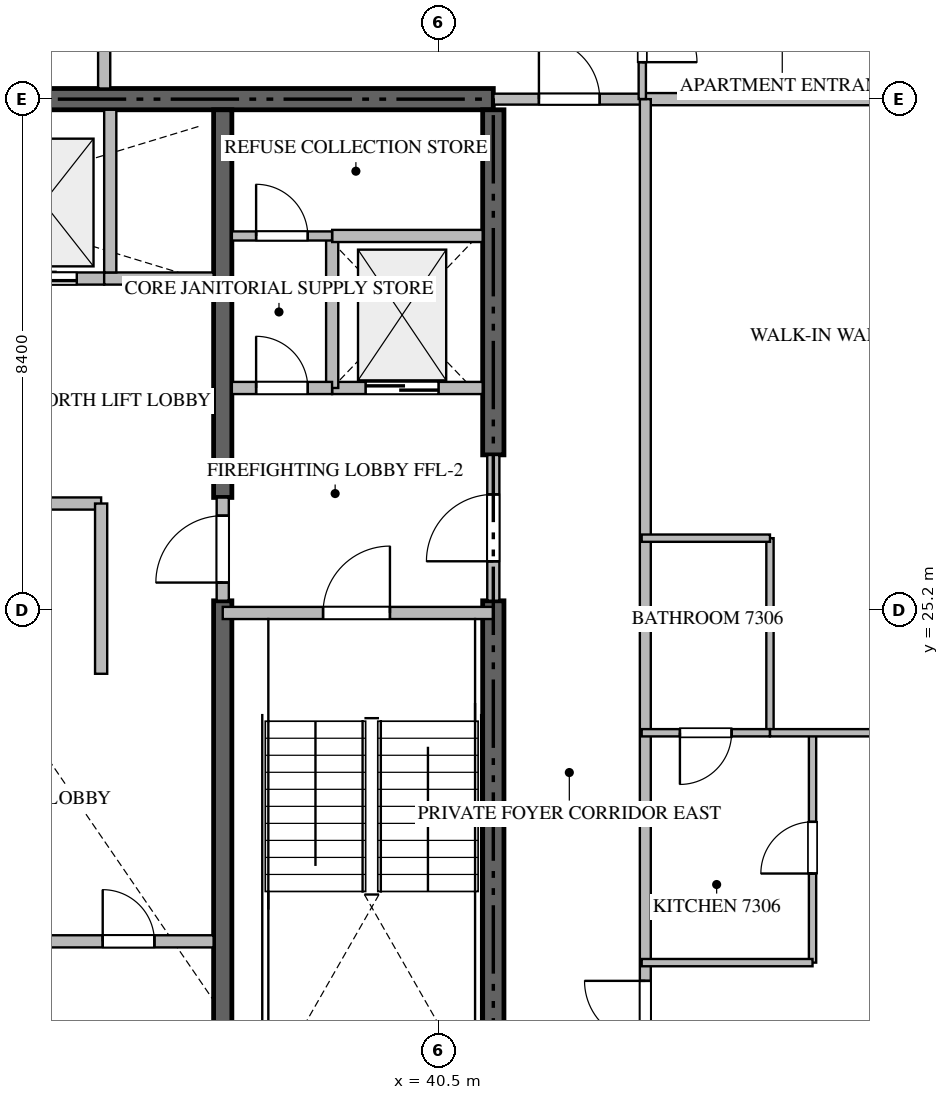
"""IFC4 building model, lengths in metres.
Left out: names, types, materials, properties, quantities, classifications, styles, units other than length and angle.
Written with IfcOpenShell. Run it as: python <this file> out.ifc"""

import sys

from ifc_helpers import new_model, si_unit, direction, frame, frame_2d, origin, place, context, subcontext, project, spatial, rectangle, extrude, source, transform, mapped, element, fill, save


model = new_model("IFC4")
c1 = context("Model", 3, precision=1e-05, world=origin(), true_north=direction((0.0, 1.0)))
c2 = subcontext(c1, "Body", "Model", "MODEL_VIEW")
j1 = project(units=[si_unit("LENGTHUNIT", "METRE"), si_unit("PLANEANGLEUNIT", "RADIAN")], contexts=[c1])
p1 = place(None, origin())
s1 = spatial("IfcSite", under=j1, at=p1, CompositionType="ELEMENT")
p2 = place(p1, origin())
s2 = spatial("IfcBuilding", under=s1, at=p2, CompositionType="ELEMENT")
p3 = place(p2, frame((0.0, 0.0, 293.45)))
s3 = spatial("IfcBuildingStorey", under=s2, at=p3, CompositionType="ELEMENT", Elevation=293.45)
p4 = place(p3, frame((41.4, 33.6, -0.26), z_axis=(0.0, 0.0, 1.0), x_axis=(-1.0, 0.0, 0.0)))
e1 = element("IfcWall", 1, at=p4, inside=s3, PredefinedType="SHEAR", context=c2, shape_type="SweptSolid", body=[
    extrude(rectangle(XDim=18.0, YDim=0.35, at=frame_2d((9.0, 0.0))), origin(), (0.0, 0.0, 1.0), 4.048),
])
p5 = place(p3, frame((41.4, 16.975, -0.26), z_axis=(0.0, 0.0, 1.0), x_axis=(0.0, 1.0, 0.0)))
e2 = element("IfcWall", 2, at=p5, inside=s3, PredefinedType="SHEAR", context=c2, shape_type="SweptSolid", body=[
    extrude(rectangle(XDim=8.375, YDim=0.35, at=frame_2d((4.188, 0.0))), origin(), (0.0, 0.0, 1.0), 4.048),
])
p6 = place(p3, frame((41.4, 27.75, -0.26), z_axis=(0.0, 0.0, 1.0), x_axis=(0.0, 1.0, 0.0)))
e3 = element("IfcWall", 3, at=p6, inside=s3, PredefinedType="SHEAR", context=c2, shape_type="SweptSolid", body=[
    extrude(rectangle(XDim=5.675, YDim=0.35, at=frame_2d((2.837, 0.0))), origin(), (0.0, 0.0, 1.0), 4.048),
])
p7 = place(p3, frame((36.95, 16.975, -0.26), z_axis=(0.0, 0.0, 1.0), x_axis=(0.0, 1.0, 0.0)))
e4 = element("IfcWall", 4, at=p7, inside=s3, PredefinedType="SHEAR", context=c2, shape_type="SweptSolid", body=[
    extrude(rectangle(XDim=8.375, YDim=0.3, at=frame_2d((4.188, 0.0))), origin(), (0.0, 0.0, 1.0), 4.048),
])
p8 = place(p3, frame((36.95, 27.05, -0.26), z_axis=(0.0, 0.0, 1.0), x_axis=(0.0, 1.0, 0.0)))
e5 = element("IfcWall", 5, at=p8, inside=s3, PredefinedType="SHEAR", context=c2, shape_type="SweptSolid", body=[
    extrude(rectangle(XDim=6.375, YDim=0.3, at=frame_2d((3.188, 0.0))), origin(), (0.0, 0.0, 1.0), 4.048),
])
p9 = place(p3, frame((36.95, 25.15, 0.0), z_axis=(0.0, 0.0, 1.0), x_axis=(1.0, 0.0, 0.0)))
e6 = element("IfcWall", 6, at=p9, inside=s3, PredefinedType="STANDARD", context=c2, shape_type="SweptSolid", body=[
    extrude(rectangle(XDim=4.45, YDim=0.2, at=frame_2d((2.225, 0.0))), origin(), (0.0, 0.0, 1.0), 3.79),
])
p10 = place(p9, frame((1.65, 0.0, 0.0)))
e7 = element("IfcOpeningElement", 7, at=p10, cuts=e6, PredefinedType="OPENING", context=c2, shape_type="SweptSolid", body=[
    extrude(rectangle(XDim=1.1, YDim=2.15, at=frame_2d((0.55, 1.075))), frame((0.0, 0.11, 0.0), z_axis=(0.0, -1.0, 0.0), x_axis=(1.0, 0.0, 0.0)), (0.0, 0.0, 1.0), 0.22),
])
p11 = place(p3, frame((38.75, 28.85, 0.0), z_axis=(0.0, 0.0, 1.0), x_axis=(1.0, 0.0, 0.0)))
e8 = element("IfcWall", 8, at=p11, inside=s3, PredefinedType="STANDARD", context=c2, shape_type="SweptSolid", body=[
    extrude(rectangle(XDim=2.475, YDim=0.2, at=frame_2d((1.238, 0.0))), origin(), (0.0, 0.0, 1.0), 3.79),
])
p12 = place(p11, frame((0.55, 0.0, 0.0)))
e9 = element("IfcOpeningElement", 9, at=p12, cuts=e8, PredefinedType="OPENING", context=c2, shape_type="SweptSolid", body=[
    extrude(rectangle(XDim=1.2, YDim=2.2, at=frame_2d((0.6, 1.1))), frame((0.0, 0.11, 0.0), z_axis=(0.0, -1.0, 0.0), x_axis=(1.0, 0.0, 0.0)), (0.0, 0.0, 1.0), 0.22),
])
p13 = place(p3, frame((32.85, 30.65, 0.0), z_axis=(0.0, 0.0, 1.0), x_axis=(1.0, 0.0, 0.0)))
e10 = element("IfcWall", 10, at=p13, inside=s3, PredefinedType="STANDARD", context=c2, shape_type="SweptSolid", body=[
    extrude(rectangle(XDim=2.15, YDim=0.2, at=frame_2d((1.075, 0.0))), origin(), (0.0, 0.0, 1.0), 3.79),
])
p14 = place(p13, frame((0.6, 0.0, 0.0)))
e11 = element("IfcOpeningElement", 11, at=p14, cuts=e10, PredefinedType="OPENING", context=c2, shape_type="SweptSolid", body=[
    extrude(rectangle(XDim=1.1, YDim=2.2, at=frame_2d((0.55, 1.1))), frame((0.0, 0.11, 0.0), z_axis=(0.0, -1.0, 0.0), x_axis=(1.0, 0.0, 0.0)), (0.0, 0.0, 1.0), 0.22),
])
p15 = place(p3, frame((35.0, 30.65, 0.0), z_axis=(0.0, 0.0, 1.0), x_axis=(1.0, 0.0, 0.0)))
e12 = element("IfcWall", 12, at=p15, inside=s3, PredefinedType="STANDARD", context=c2, shape_type="SweptSolid", body=[
    extrude(rectangle(XDim=1.8, YDim=0.2, at=frame_2d((0.9, 0.0))), origin(), (0.0, 0.0, 1.0), 3.79),
])
p16 = place(p3, frame((35.1, 30.75, 0.0), z_axis=(0.0, 0.0, 1.0), x_axis=(0.0, 1.0, 0.0)))
e13 = element("IfcWall", 13, at=p16, inside=s3, PredefinedType="STANDARD", context=c2, shape_type="SweptSolid", body=[
    extrude(rectangle(XDim=2.675, YDim=0.2, at=frame_2d((1.337, 0.0))), origin(), (0.0, 0.0, 1.0), 3.79),
])
p17 = place(p3, frame((38.75, 28.85, 0.0), z_axis=(0.0, 0.0, 1.0), x_axis=(0.0, 1.0, 0.0)))
e14 = element("IfcWall", 14, at=p17, inside=s3, PredefinedType="STANDARD", context=c2, shape_type="SweptSolid", body=[
    extrude(rectangle(XDim=2.5, YDim=0.2, at=frame_2d((1.25, 0.0))), origin(), (0.0, 0.0, 1.0), 3.79),
])
p18 = place(p3, frame((38.75, 31.35, 0.0), z_axis=(0.0, 0.0, 1.0), x_axis=(1.0, 0.0, 0.0)))
e15 = element("IfcWall", 15, at=p18, inside=s3, PredefinedType="STANDARD", context=c2, shape_type="SweptSolid", body=[
    extrude(rectangle(XDim=2.475, YDim=0.2, at=frame_2d((1.238, 0.0))), origin(), (0.0, 0.0, 1.0), 3.79),
])
p19 = place(p3, frame((37.1, 28.85, 0.0), z_axis=(0.0, 0.0, 1.0), x_axis=(1.0, 0.0, 0.0)))
e16 = element("IfcWall", 16, at=p19, inside=s3, PredefinedType="STANDARD", context=c2, shape_type="SweptSolid", body=[
    extrude(rectangle(XDim=1.648, YDim=0.2, at=frame_2d((0.824, 0.0))), origin(), (0.0, 0.0, 1.0), 3.79),
])
p20 = place(p19, frame((0.399, 0.0, 0.0)))
e17 = element("IfcOpeningElement", 17, at=p20, cuts=e16, PredefinedType="OPENING", context=c2, shape_type="SweptSolid", body=[
    extrude(rectangle(XDim=0.85, YDim=2.1, at=frame_2d((0.425, 1.05))), frame((0.0, 0.11, 0.0), z_axis=(0.0, -1.0, 0.0), x_axis=(1.0, 0.0, 0.0)), (0.0, 0.0, 1.0), 0.22),
])
p21 = place(p3, frame((41.4, 25.352, 0.0), z_axis=(0.0, 0.0, 1.0), x_axis=(0.0, 1.0, 0.0)))
e18 = element("IfcWall", 18, at=p21, inside=s3, PredefinedType="STANDARD", context=c2, shape_type="SweptSolid", body=[
    extrude(rectangle(XDim=2.396, YDim=0.2, at=frame_2d((1.198, 0.0))), origin(), (0.0, 0.0, 1.0), 3.79),
])
p22 = place(p21, frame((0.648, 0.0, 0.0)))
e19 = element("IfcOpeningElement", 19, at=p22, cuts=e18, PredefinedType="OPENING", context=c2, shape_type="SweptSolid", body=[
    extrude(rectangle(XDim=1.1, YDim=2.15, at=frame_2d((0.55, 1.075))), frame((0.0, 0.11, 0.0), z_axis=(0.0, -1.0, 0.0), x_axis=(1.0, 0.0, 0.0)), (0.0, 0.0, 1.0), 0.22),
])
p23 = place(p3, frame((36.95, 25.352, 0.0), z_axis=(0.0, 0.0, 1.0), x_axis=(0.0, 1.0, 0.0)))
e20 = element("IfcWall", 20, at=p23, inside=s3, PredefinedType="STANDARD", context=c2, shape_type="SweptSolid", body=[
    extrude(rectangle(XDim=1.696, YDim=0.2, at=frame_2d((0.848, 0.0))), origin(), (0.0, 0.0, 1.0), 3.79),
])
p24 = place(p23, frame((0.298, 0.0, 0.0)))
e21 = element("IfcOpeningElement", 21, at=p24, cuts=e20, PredefinedType="OPENING", context=c2, shape_type="SweptSolid", body=[
    extrude(rectangle(XDim=1.1, YDim=2.15, at=frame_2d((0.55, 1.075))), frame((0.0, 0.11, 0.0), z_axis=(0.0, -1.0, 0.0), x_axis=(1.0, 0.0, 0.0)), (0.0, 0.0, 1.0), 0.22),
])
p25 = place(p3, frame((37.1, 31.35, 0.0), z_axis=(0.0, 0.0, 1.0), x_axis=(1.0, 0.0, 0.0)))
e22 = element("IfcWall", 22, at=p25, inside=s3, PredefinedType="PARTITIONING", context=c2, shape_type="SweptSolid", body=[
    extrude(rectangle(XDim=1.648, YDim=0.15, at=frame_2d((0.824, 0.0))), origin(), (0.0, 0.0, 1.0), 3.79),
])
p26 = place(p25, frame((0.399, 0.0, 0.0)))
e23 = element("IfcOpeningElement", 23, at=p26, cuts=e22, PredefinedType="OPENING", context=c2, shape_type="SweptSolid", body=[
    extrude(rectangle(XDim=0.85, YDim=2.1, at=frame_2d((0.425, 1.05))), frame((0.0, 0.085, 0.0), z_axis=(0.0, -1.0, 0.0), x_axis=(1.0, 0.0, 0.0)), (0.0, 0.0, 1.0), 0.17),
])
p27 = place(p3, frame((34.002, 19.75, 0.0), z_axis=(0.0, 0.0, 1.0), x_axis=(1.0, 0.0, 0.0)))
e24 = element("IfcWall", 24, at=p27, inside=s3, PredefinedType="STANDARD", context=c2, shape_type="SweptSolid", body=[
    extrude(rectangle(XDim=2.798, YDim=0.2, at=frame_2d((1.399, 0.0))), origin(), (0.0, 0.0, 1.0), 3.79),
])
p28 = place(p27, frame((0.974, 0.0, 0.0)))
e25 = element("IfcOpeningElement", 25, at=p28, cuts=e24, PredefinedType="OPENING", context=c2, shape_type="SweptSolid", body=[
    extrude(rectangle(XDim=0.85, YDim=2.1, at=frame_2d((0.425, 1.05))), frame((0.0, 0.11, 0.0), z_axis=(0.0, -1.0, 0.0), x_axis=(1.0, 0.0, 0.0)), (0.0, 0.0, 1.0), 0.22),
])
p29 = place(p3, frame((28.0, 26.95, 0.0), z_axis=(0.0, 0.0, 1.0), x_axis=(1.0, 0.0, 0.0)))
e26 = element("IfcWall", 26, at=p29, inside=s3, PredefinedType="STANDARD", context=c2, shape_type="SweptSolid", body=[
    extrude(rectangle(XDim=6.95, YDim=0.2, at=frame_2d((3.475, 0.0))), origin(), (0.0, 0.0, 1.0), 3.79),
])
p30 = place(p3, frame((34.95, 24.15, 0.0), z_axis=(0.0, 0.0, 1.0), x_axis=(0.0, 1.0, 0.0)))
e27 = element("IfcWall", 27, at=p30, inside=s3, PredefinedType="STANDARD", context=c2, shape_type="SweptSolid", body=[
    extrude(rectangle(XDim=2.8, YDim=0.2, at=frame_2d((1.4, 0.0))), origin(), (0.0, 0.0, 1.0), 3.79),
])
p31 = place(p3, frame((35.0, 33.775, 0.0), z_axis=(0.0, 0.0, 1.0), x_axis=(0.0, 1.0, 0.0)))
e28 = element("IfcWall", 28, at=p31, inside=s3, PredefinedType="PARTITIONING", context=c2, shape_type="SweptSolid", body=[
    extrude(rectangle(XDim=14.143, YDim=0.2, at=frame_2d((7.072, 0.0))), origin(), (0.0, 0.0, 1.0), 3.79),
])
p32 = place(p3, frame((43.9, 33.6, 0.0), z_axis=(0.0, 0.0, 1.0), x_axis=(1.0, 0.0, 0.0)))
e29 = element("IfcWall", 29, at=p32, inside=s3, PredefinedType="PARTITIONING", context=c2, shape_type="SweptSolid", body=[
    extrude(rectangle(XDim=11.618, YDim=0.2, at=frame_2d((5.809, 0.0))), origin(), (0.0, 0.0, 1.0), 3.79),
])
p33 = place(p3, frame((41.402, 33.6, 0.0), z_axis=(0.0, 0.0, 1.0), x_axis=(1.0, 0.0, 0.0)))
e30 = element("IfcWall", 30, at=p33, inside=s3, PredefinedType="PARTITIONING", context=c2, shape_type="SweptSolid", body=[
    extrude(rectangle(XDim=2.496, YDim=0.18, at=frame_2d((1.248, 0.0))), origin(), (0.0, 0.0, 1.0), 3.79),
])
p34 = place(p33, frame((0.748, 0.0, 0.0)))
e31 = element("IfcOpeningElement", 31, at=p34, cuts=e30, PredefinedType="OPENING", context=c2, shape_type="SweptSolid", body=[
    extrude(rectangle(XDim=1.0, YDim=2.15, at=frame_2d((0.5, 1.075))), frame((0.0, 0.1, 0.0), z_axis=(0.0, -1.0, 0.0), x_axis=(1.0, 0.0, 0.0)), (0.0, 0.0, 1.0), 0.2),
])
p35 = place(p3, frame((43.9, 16.8, 0.0), z_axis=(0.0, 0.0, 1.0), x_axis=(0.0, 1.0, 0.0)))
e32 = element("IfcWall", 32, at=p35, inside=s3, PredefinedType="PARTITIONING", context=c2, shape_type="SweptSolid", body=[
    extrude(rectangle(XDim=16.8, YDim=0.18, at=frame_2d((8.4, 0.0))), origin(), (0.0, 0.0, 1.0), 3.79),
])
p36 = place(p35, frame((1.3, 0.0, 0.0)))
e33 = element("IfcOpeningElement", 33, at=p36, cuts=e32, PredefinedType="OPENING", context=c2, shape_type="SweptSolid", body=[
    extrude(rectangle(XDim=1.0, YDim=2.15, at=frame_2d((0.5, 1.075))), frame((0.0, 0.1, 0.0), z_axis=(0.0, -1.0, 0.0), x_axis=(1.0, 0.0, 0.0)), (0.0, 0.0, 1.0), 0.2),
])
p37 = place(p3, frame((43.85, 35.75, 0.0), z_axis=(0.0, 0.0, 1.0), x_axis=(0.0, -1.0, 0.0)))
e34 = element("IfcWall", 34, at=p37, inside=s3, PredefinedType="PARTITIONING", context=c2, shape_type="SweptSolid", body=[
    extrude(rectangle(XDim=2.148, YDim=0.12, at=frame_2d((1.074, 0.0))), origin(), (0.0, 0.0, 1.0), 3.79),
])
p38 = place(p37, frame((0.642, 0.0, 0.0)))
e35 = element("IfcOpeningElement", 35, at=p38, cuts=e34, PredefinedType="OPENING", context=c2, shape_type="SweptSolid", body=[
    extrude(rectangle(XDim=0.9, YDim=2.1, at=frame_2d((0.45, 1.05))), frame((0.0, 0.07, 0.0), z_axis=(0.0, -1.0, 0.0), x_axis=(1.0, 0.0, 0.0)), (0.0, 0.0, 1.0), 0.14),
])
p39 = place(p3, frame((46.65, 19.4, 0.0), z_axis=(0.0, 0.0, 1.0), x_axis=(0.0, 1.0, 0.0)))
e36 = element("IfcWall", 36, at=p39, inside=s3, PredefinedType="PARTITIONING", context=c2, shape_type="SweptSolid", body=[
    extrude(rectangle(XDim=3.78, YDim=0.12, at=frame_2d((1.89, 0.0))), origin(), (0.0, 0.0, 1.0), 3.79),
])
p40 = place(p39, frame((1.465, 0.0, 0.0)))
e37 = element("IfcOpeningElement", 37, at=p40, cuts=e36, PredefinedType="OPENING", context=c2, shape_type="SweptSolid", body=[
    extrude(rectangle(XDim=0.85, YDim=2.1, at=frame_2d((0.425, 1.05))), frame((0.0, 0.07, 0.0), z_axis=(0.0, -1.0, 0.0), x_axis=(1.0, 0.0, 0.0)), (0.0, 0.0, 1.0), 0.14),
])
p41 = place(p3, frame((46.65, 19.4, 0.0), z_axis=(0.0, 0.0, 1.0), x_axis=(-1.0, 0.0, 0.0)))
e38 = element("IfcWall", 38, at=p41, inside=s3, PredefinedType="PARTITIONING", context=c2, shape_type="SweptSolid", body=[
    extrude(rectangle(XDim=2.81, YDim=0.12, at=frame_2d((1.405, 0.0))), origin(), (0.0, 0.0, 1.0), 3.79),
])
p42 = place(p3, frame((45.95, 23.18, 0.0), z_axis=(0.0, 0.0, 1.0), x_axis=(0.0, 1.0, 0.0)))
e39 = element("IfcWall", 39, at=p42, inside=s3, PredefinedType="PARTITIONING", context=c2, shape_type="SweptSolid", body=[
    extrude(rectangle(XDim=3.2, YDim=0.12, at=frame_2d((1.6, 0.0))), origin(), (0.0, 0.0, 1.0), 3.79),
])
p43 = place(p3, frame((45.95, 26.38, 0.0), z_axis=(0.0, 0.0, 1.0), x_axis=(-1.0, 0.0, 0.0)))
e40 = element("IfcWall", 40, at=p43, inside=s3, PredefinedType="PARTITIONING", context=c2, shape_type="SweptSolid", body=[
    extrude(rectangle(XDim=2.11, YDim=0.12, at=frame_2d((1.055, 0.0))), origin(), (0.0, 0.0, 1.0), 3.79),
])
p44 = place(p3, frame((51.409, 23.18, 0.0), z_axis=(0.0, 0.0, 1.0), x_axis=(-1.0, 0.0, 0.0)))
e41 = element("IfcWall", 41, at=p44, inside=s3, PredefinedType="PARTITIONING", context=c2, shape_type="SweptSolid", body=[
    extrude(rectangle(XDim=5.459, YDim=0.12, at=frame_2d((2.729, 0.0))), origin(), (0.0, 0.0, 1.0), 3.79),
])
p45 = place(p44, frame((2.304, 0.0, 0.0)))
e42 = element("IfcOpeningElement", 42, at=p45, cuts=e41, PredefinedType="OPENING", context=c2, shape_type="SweptSolid", body=[
    extrude(rectangle(XDim=0.85, YDim=2.1, at=frame_2d((0.425, 1.05))), frame((0.0, 0.07, 0.0), z_axis=(0.0, -1.0, 0.0), x_axis=(1.0, 0.0, 0.0)), (0.0, 0.0, 1.0), 0.14),
])
p46 = place(p3, frame((45.948, 23.18, 0.0), z_axis=(0.0, 0.0, 1.0), x_axis=(-1.0, 0.0, 0.0)))
e43 = element("IfcWall", 43, at=p46, inside=s3, PredefinedType="PARTITIONING", context=c2, shape_type="SweptSolid", body=[
    extrude(rectangle(XDim=2.108, YDim=0.12, at=frame_2d((1.054, 0.0))), origin(), (0.0, 0.0, 1.0), 3.79),
])
p47 = place(p46, frame((0.629, 0.0, 0.0)))
e44 = element("IfcOpeningElement", 44, at=p47, cuts=e43, PredefinedType="OPENING", context=c2, shape_type="SweptSolid", body=[
    extrude(rectangle(XDim=0.85, YDim=2.1, at=frame_2d((0.425, 1.05))), frame((0.0, 0.07, 0.0), z_axis=(0.0, -1.0, 0.0), x_axis=(1.0, 0.0, 0.0)), (0.0, 0.0, 1.0), 0.14),
])
m1 = source(origin(), c2, "Body", "SweptSolid", [
    extrude(rectangle(XDim=1.1, YDim=2.15, at=frame_2d((0.55, 1.075))), frame((0.0, 0.025, 0.0), z_axis=(0.0, -1.0, 0.0), x_axis=(1.0, 0.0, 0.0)), (0.0, 0.0, 1.0), 0.05),
])
p48 = place(p10, origin())
e45 = element("IfcDoor", 45, at=p48, inside=s3, OperationType="SINGLE_SWING_RIGHT", PredefinedType="DOOR", context=c2, shape_type="MappedRepresentation", body=[
    mapped(m1, transform((0.0, 0.0, 0.0), scale=1.0)),
])
fill(e7, e45)
m2 = source(origin(), c2, "Body", "SweptSolid", [
    extrude(rectangle(XDim=1.2, YDim=2.2, at=frame_2d((0.6, 1.1))), frame((0.0, 0.025, 0.0), z_axis=(0.0, -1.0, 0.0), x_axis=(1.0, 0.0, 0.0)), (0.0, 0.0, 1.0), 0.05),
])
p49 = place(p12, origin())
e46 = element("IfcDoor", 46, at=p49, inside=s3, OperationType="DOUBLE_DOOR_SLIDING", PredefinedType="DOOR", context=c2, shape_type="MappedRepresentation", body=[
    mapped(m2, transform((0.0, 0.0, 0.0), scale=1.0)),
])
fill(e9, e46)
m3 = source(origin(), c2, "Body", "SweptSolid", [
    extrude(rectangle(XDim=1.1, YDim=2.2, at=frame_2d((0.55, 1.1))), frame((0.0, 0.025, 0.0), z_axis=(0.0, -1.0, 0.0), x_axis=(1.0, 0.0, 0.0)), (0.0, 0.0, 1.0), 0.05),
])
p50 = place(p14, origin())
e47 = element("IfcDoor", 47, at=p50, inside=s3, OperationType="DOUBLE_DOOR_SLIDING", PredefinedType="DOOR", context=c2, shape_type="MappedRepresentation", body=[
    mapped(m3, transform((0.0, 0.0, 0.0), scale=1.0)),
])
fill(e11, e47)
m4 = source(origin(), c2, "Body", "SweptSolid", [
    extrude(rectangle(XDim=0.85, YDim=2.1, at=frame_2d((0.425, 1.05))), frame((0.0, 0.025, 0.0), z_axis=(0.0, -1.0, 0.0), x_axis=(1.0, 0.0, 0.0)), (0.0, 0.0, 1.0), 0.05),
])
p51 = place(p20, origin())
e48 = element("IfcDoor", 48, at=p51, inside=s3, OperationType="SINGLE_SWING_LEFT", PredefinedType="DOOR", context=c2, shape_type="MappedRepresentation", body=[
    mapped(m4, transform((0.0, 0.0, 0.0), scale=1.0)),
])
fill(e17, e48)
p52 = place(p22, origin())
e49 = element("IfcDoor", 49, at=p52, inside=s3, OperationType="SINGLE_SWING_LEFT", PredefinedType="DOOR", context=c2, shape_type="MappedRepresentation", body=[
    mapped(m1, transform((0.0, 0.0, 0.0), scale=1.0)),
])
fill(e19, e49)
p53 = place(p24, origin())
e50 = element("IfcDoor", 50, at=p53, inside=s3, OperationType="SINGLE_SWING_LEFT", PredefinedType="DOOR", context=c2, shape_type="MappedRepresentation", body=[
    mapped(m1, transform((0.0, 0.0, 0.0), scale=1.0)),
])
fill(e21, e50)
p54 = place(p26, origin())
e51 = element("IfcDoor", 51, at=p54, inside=s3, OperationType="SINGLE_SWING_LEFT", PredefinedType="DOOR", context=c2, shape_type="MappedRepresentation", body=[
    mapped(m4, transform((0.0, 0.0, 0.0), scale=1.0)),
])
fill(e23, e51)
p55 = place(p28, origin())
e52 = element("IfcDoor", 52, at=p55, inside=s3, OperationType="SINGLE_SWING_LEFT", PredefinedType="DOOR", context=c2, shape_type="MappedRepresentation", body=[
    mapped(m4, transform((0.0, 0.0, 0.0), scale=1.0)),
])
fill(e25, e52)
m5 = source(origin(), c2, "Body", "SweptSolid", [
    extrude(rectangle(XDim=1.0, YDim=2.15, at=frame_2d((0.5, 1.075))), frame((0.0, 0.025, 0.0), z_axis=(0.0, -1.0, 0.0), x_axis=(1.0, 0.0, 0.0)), (0.0, 0.0, 1.0), 0.05),
])
p56 = place(p34, origin())
e53 = element("IfcDoor", 53, at=p56, inside=s3, OperationType="SINGLE_SWING_LEFT", PredefinedType="DOOR", context=c2, shape_type="MappedRepresentation", body=[
    mapped(m5, transform((0.0, 0.0, 0.0), scale=1.0)),
])
fill(e31, e53)
p57 = place(p36, origin())
e54 = element("IfcDoor", 54, at=p57, inside=s3, OperationType="SINGLE_SWING_RIGHT", PredefinedType="DOOR", context=c2, shape_type="MappedRepresentation", body=[
    mapped(m5, transform((0.0, 0.0, 0.0), scale=1.0)),
])
fill(e33, e54)
m6 = source(origin(), c2, "Body", "SweptSolid", [
    extrude(rectangle(XDim=0.9, YDim=2.1, at=frame_2d((0.45, 1.05))), frame((0.0, 0.025, 0.0), z_axis=(0.0, -1.0, 0.0), x_axis=(1.0, 0.0, 0.0)), (0.0, 0.0, 1.0), 0.05),
])
p58 = place(p38, origin())
e55 = element("IfcDoor", 55, at=p58, inside=s3, OperationType="SINGLE_SWING_RIGHT", PredefinedType="DOOR", context=c2, shape_type="MappedRepresentation", body=[
    mapped(m6, transform((0.0, 0.0, 0.0), scale=1.0)),
])
fill(e35, e55)
p59 = place(p40, origin())
e56 = element("IfcDoor", 56, at=p59, inside=s3, OperationType="SINGLE_SWING_LEFT", PredefinedType="DOOR", context=c2, shape_type="MappedRepresentation", body=[
    mapped(m4, transform((0.0, 0.0, 0.0), scale=1.0)),
])
fill(e37, e56)
p60 = place(p47, origin())
e57 = element("IfcDoor", 57, at=p60, inside=s3, OperationType="SINGLE_SWING_RIGHT", PredefinedType="DOOR", context=c2, shape_type="MappedRepresentation", body=[
    mapped(m4, transform((0.0, 0.0, 0.0), scale=1.0)),
])
fill(e44, e57)
save(model, sys.argv[1])
